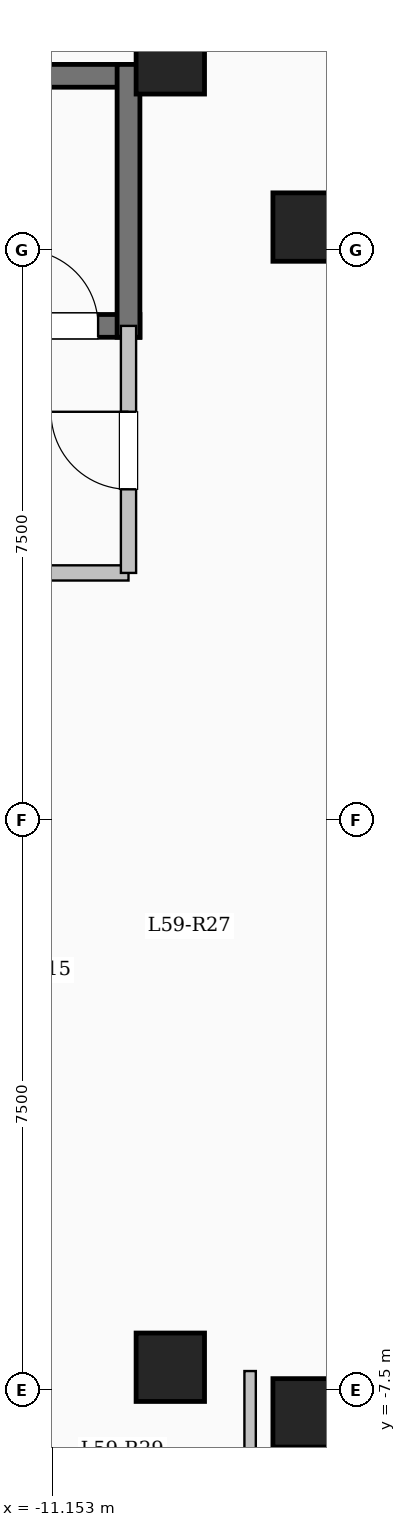
"""IFC4 building model, lengths in metres.
Left out: names, types, materials, properties, quantities, classifications, styles, units other than length and angle.
Written with IfcOpenShell. Run it as: python <this file> out.ifc"""

import sys

from ifc_helpers import new_model, si_unit, direction, frame, frame_2d, origin, origin_2d, place, context, subcontext, project, spatial, rectangle, extrude, element, fill, save


model = new_model("IFC4")
c1 = context("Model", 3, precision=1e-05, world=origin(), true_north=direction((0.0, 1.0)))
c2 = subcontext(c1, "Body", "Model", "MODEL_VIEW")
j1 = project(units=[si_unit("LENGTHUNIT", "METRE"), si_unit("PLANEANGLEUNIT", "RADIAN")], contexts=[c1])
p1 = place(None, origin())
s1 = spatial("IfcSite", under=j1, at=p1, CompositionType="ELEMENT")
p2 = place(p1, origin())
s2 = spatial("IfcBuilding", under=s1, at=p2, CompositionType="ELEMENT")
p3 = place(p2, frame((0.0, 0.0, 217.05)))
s3 = spatial("IfcBuildingStorey", under=s2, at=p3, CompositionType="ELEMENT", Elevation=217.05)
for number, where, z_axis, x_axis in (
    (1, (-7.8, -7.8, 0.0), (0.0, 0.0, 1.0), (1.0, 0.0, 0.0)),
    (2, (-7.8, 7.8, 0.0), (0.0, 0.0, 1.0), (1.0, 0.0, 0.0)),
    (3, (-9.6, -7.2, 0.0), (0.0, 0.0, 1.0), (1.0, 0.0, 0.0)),
    (4, (-9.6, 10.0, 0.0), (0.0, 0.0, 1.0), (1.0, 0.0, 0.0)),
):
    element("IfcColumn", number, at=place(p3, frame(where, z_axis=z_axis, x_axis=x_axis)), inside=s3, PredefinedType="COLUMN", context=c2, shape_type="SweptSolid", body=[
        extrude(rectangle(XDim=0.9, YDim=0.9, at=origin_2d()), origin(), (0.0, 0.0, 1.0), 3.35),
    ])
p4 = place(p3, frame((-18.0, 9.79, 0.0), z_axis=(0.0, 0.0, 1.0), x_axis=(1.0, 0.0, 0.0)))
e5 = element("IfcWall", 5, at=p4, inside=s3, PredefinedType="SHEAR", context=c2, shape_type="SweptSolid", body=[
    extrude(rectangle(XDim=8.0, YDim=0.3, at=frame_2d((4.0, 0.0))), origin(), (0.0, 0.0, 1.0), 3.35),
])
p5 = place(p3, frame((-18.0, 6.5, 0.0), z_axis=(0.0, 0.0, 1.0), x_axis=(1.0, 0.0, 0.0)))
e6 = element("IfcWall", 6, at=p5, inside=s3, PredefinedType="SHEAR", context=c2, shape_type="SweptSolid", body=[
    extrude(rectangle(XDim=8.0, YDim=0.3, at=frame_2d((4.0, 0.0))), origin(), (0.0, 0.0, 1.0), 3.35),
])
p6 = place(p5, frame((6.45, 0.0, 0.0)))
e7 = element("IfcOpeningElement", 7, at=p6, cuts=e6, PredefinedType="OPENING", context=c2, shape_type="SweptSolid", body=[
    extrude(rectangle(XDim=1.0, YDim=2.15, at=frame_2d((0.5, 1.075))), frame((0.0, 0.16, 0.0), z_axis=(0.0, -1.0, 0.0), x_axis=(1.0, 0.0, 0.0)), (0.0, 0.0, 1.0), 0.32),
])
p7 = place(p3, frame((-10.15, 6.35, 0.0), z_axis=(0.0, 0.0, 1.0), x_axis=(0.0, 1.0, 0.0)))
e8 = element("IfcWall", 8, at=p7, inside=s3, PredefinedType="SHEAR", context=c2, shape_type="SweptSolid", body=[
    extrude(rectangle(XDim=3.59, YDim=0.3, at=frame_2d((1.795, 0.0))), origin(), (0.0, 0.0, 1.0), 3.35),
])
p8 = place(p3, frame((-15.55, 3.25, 0.0), z_axis=(0.0, 0.0, 1.0), x_axis=(1.0, 0.0, 0.0)))
e9 = element("IfcWall", 9, at=p8, inside=s3, PredefinedType="SOLIDWALL", context=c2, shape_type="SweptSolid", body=[
    extrude(rectangle(XDim=5.4, YDim=0.2, at=frame_2d((2.7, 0.0))), origin(), (0.0, 0.0, 1.0), 3.1),
])
p9 = place(p3, frame((-10.15, 3.25, 0.0), z_axis=(0.0, 0.0, 1.0), x_axis=(0.0, 1.0, 0.0)))
e10 = element("IfcWall", 10, at=p9, inside=s3, PredefinedType="SOLIDWALL", context=c2, shape_type="SweptSolid", body=[
    extrude(rectangle(XDim=3.25, YDim=0.2, at=frame_2d((1.625, 0.0))), origin(), (0.0, 0.0, 1.0), 3.1),
])
p10 = place(p9, frame((1.1, 0.0, 0.0)))
e11 = element("IfcOpeningElement", 11, at=p10, cuts=e10, PredefinedType="OPENING", context=c2, shape_type="SweptSolid", body=[
    extrude(rectangle(XDim=1.02, YDim=2.15, at=frame_2d((0.51, 1.075))), frame((0.0, 0.11, 0.0), z_axis=(0.0, -1.0, 0.0), x_axis=(1.0, 0.0, 0.0)), (0.0, 0.0, 1.0), 0.22),
])
p11 = place(p3, frame((-8.55, -9.4, 0.0), z_axis=(0.0, 0.0, 1.0), x_axis=(0.0, 1.0, 0.0)))
e12 = element("IfcWall", 12, at=p11, inside=s3, PredefinedType="PARTITIONING", context=c2, shape_type="SweptSolid", body=[
    extrude(rectangle(XDim=2.15, YDim=0.15, at=frame_2d((1.075, 0.0))), origin(), (0.0, 0.0, 1.0), 3.1),
])
p12 = place(p6, origin())
e13 = element("IfcDoor", 13, at=p12, inside=s3, OperationType="SINGLE_SWING_LEFT", PredefinedType="DOOR", context=c2, shape_type="SweptSolid", body=[
    extrude(rectangle(XDim=1.0, YDim=2.15, at=frame_2d((0.5, 1.075))), frame((0.0, 0.025, 0.0), z_axis=(0.0, -1.0, 0.0), x_axis=(1.0, 0.0, 0.0)), (0.0, 0.0, 1.0), 0.05),
])
fill(e7, e13)
p13 = place(p10, origin())
e14 = element("IfcDoor", 14, at=p13, inside=s3, OperationType="SINGLE_SWING_RIGHT", PredefinedType="DOOR", context=c2, shape_type="SweptSolid", body=[
    extrude(rectangle(XDim=1.02, YDim=2.15, at=frame_2d((0.51, 1.075))), frame((0.0, 0.025, 0.0), z_axis=(0.0, -1.0, 0.0), x_axis=(1.0, 0.0, 0.0)), (0.0, 0.0, 1.0), 0.05),
])
fill(e11, e14)
save(model, sys.argv[1])
